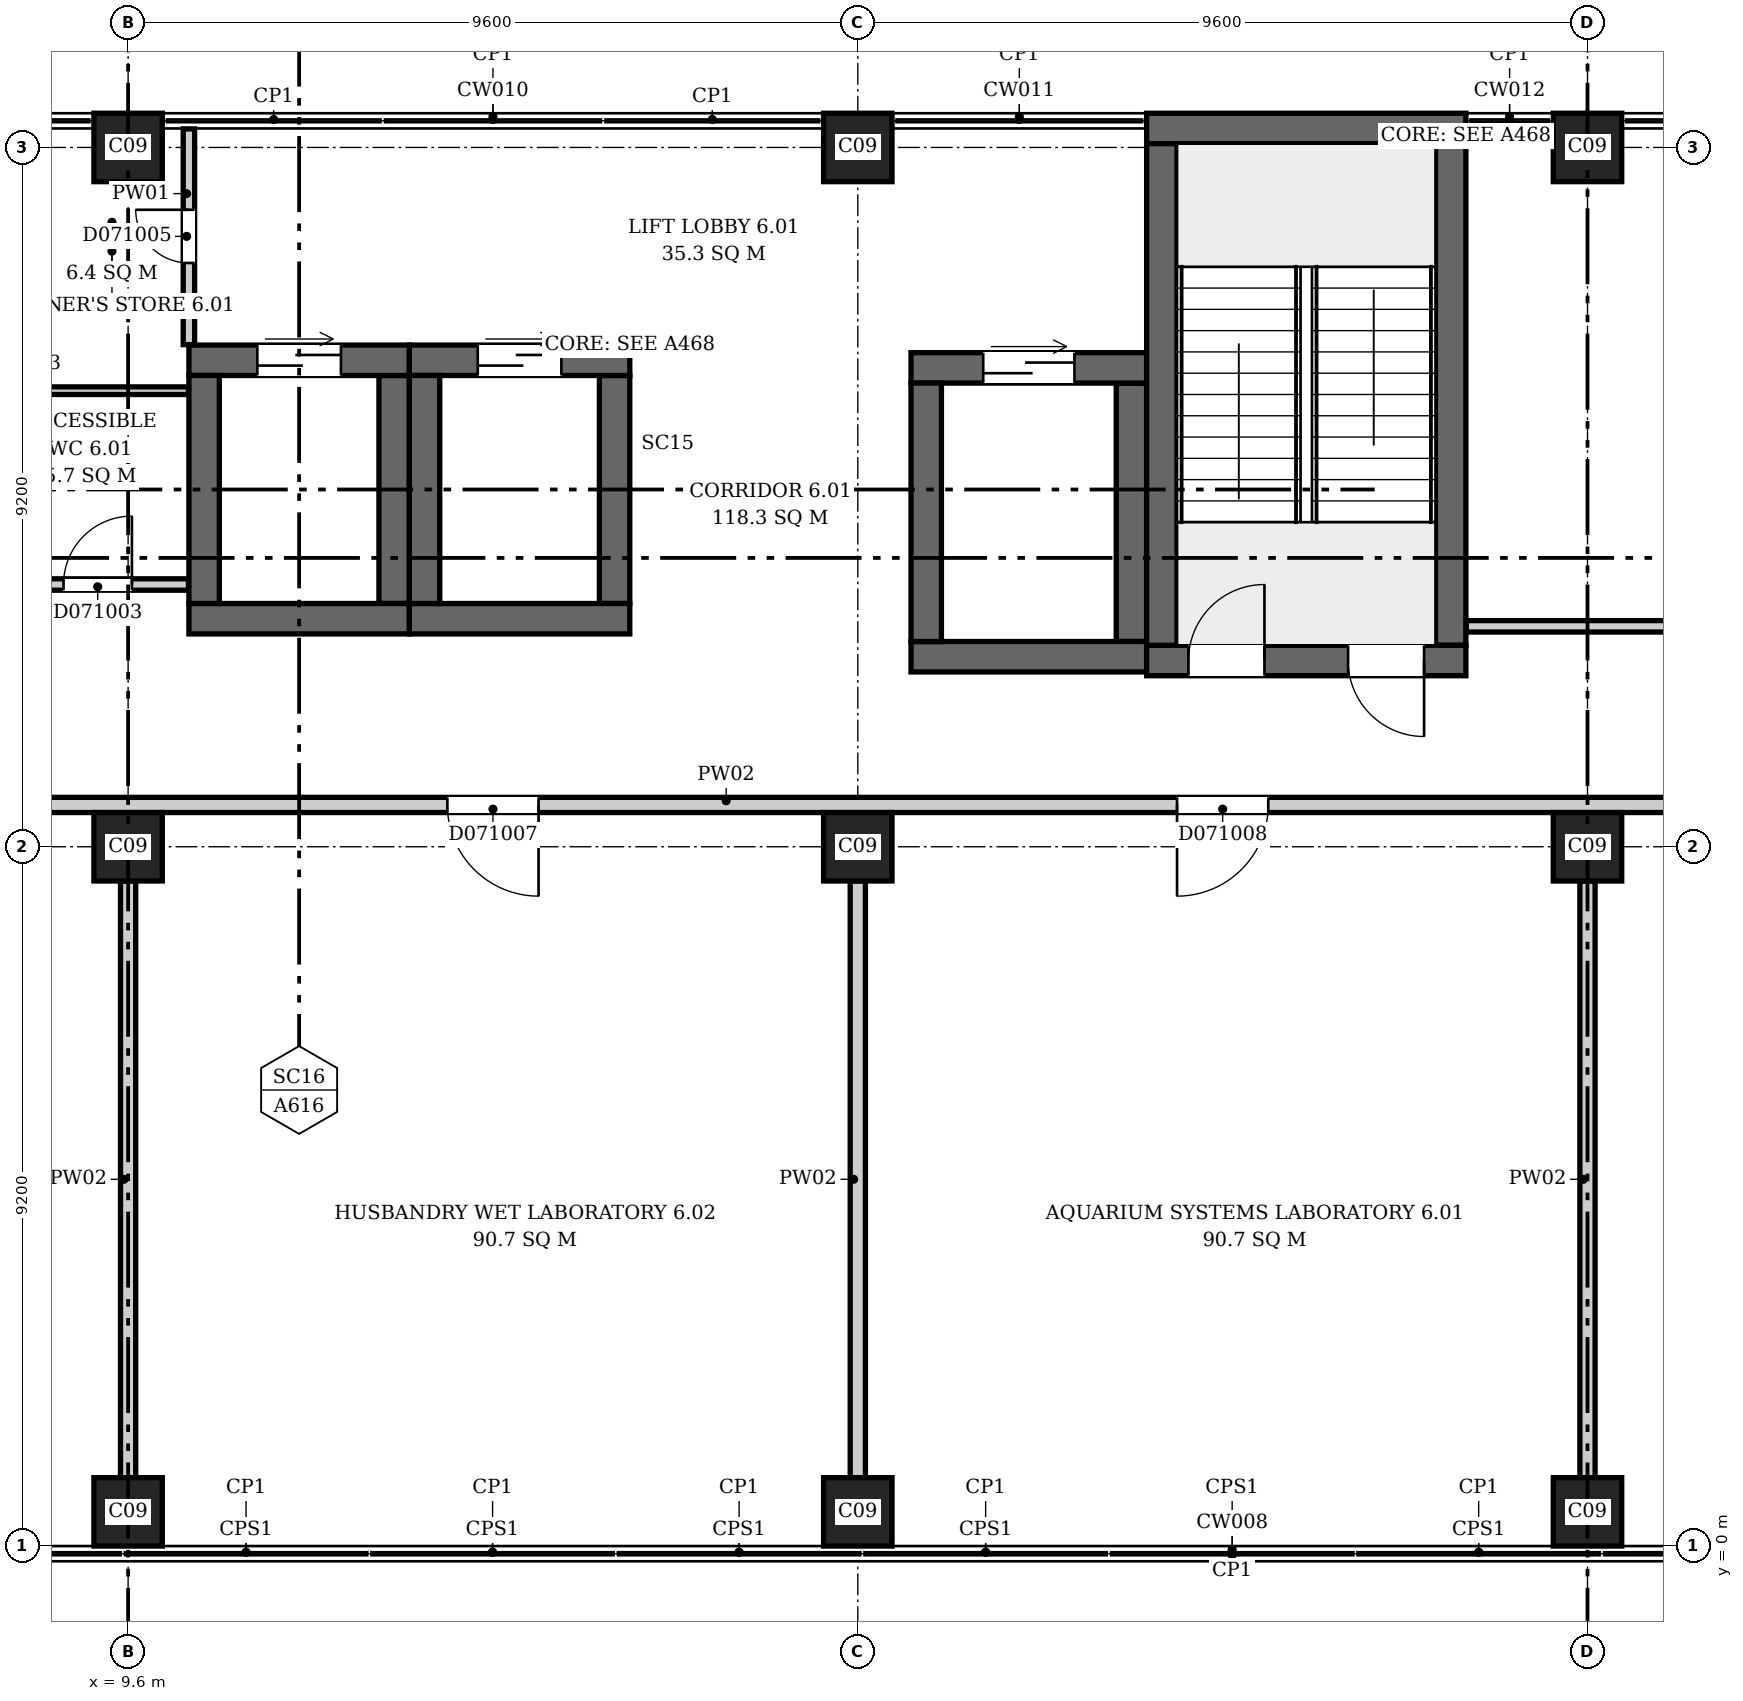
"""IFC4 building model, lengths in metres.
Left out: names, types, materials, properties, quantities, classifications, styles, units other than length and angle.
Written with IfcOpenShell. Run it as: python <this file> out.ifc"""

import sys

from ifc_helpers import new_model, si_unit, direction, frame, frame_2d, origin, origin_2d, place, context, subcontext, project, spatial, rectangle, extrude, element, fill, save


model = new_model("IFC4")
c1 = context("Model", 3, precision=1e-05, world=origin(), true_north=direction((0.0, 1.0)))
c2 = subcontext(c1, "Body", "Model", "MODEL_VIEW")
j1 = project(units=[si_unit("LENGTHUNIT", "METRE"), si_unit("PLANEANGLEUNIT", "RADIAN")], contexts=[c1])
p1 = place(None, origin())
s1 = spatial("IfcSite", under=j1, at=p1, CompositionType="ELEMENT")
p2 = place(p1, origin())
s2 = spatial("IfcBuilding", under=s1, at=p2, CompositionType="ELEMENT")
p3 = place(p2, frame((0.0, 0.0, 36.1)))
s3 = spatial("IfcBuildingStorey", under=s2, at=p3, CompositionType="ELEMENT", Elevation=36.1)
p4 = place(p3, frame((23.0, 11.65, 0.0), z_axis=(0.0, 0.0, 1.0), x_axis=(1.0, 0.0, 0.0)))
e1 = element("IfcWall", 1, at=p4, inside=s3, PredefinedType="SHEAR", context=c2, shape_type="SweptSolid", body=[
    extrude(rectangle(XDim=4.2, YDim=0.4, at=frame_2d((2.1, 0.0))), origin(), (0.0, 0.0, 1.0), 4.2),
])
p5 = place(p4, frame((0.55, 0.0, 0.0)))
e2 = element("IfcOpeningElement", 2, at=p5, cuts=e1, PredefinedType="OPENING", context=c2, shape_type="SweptSolid", body=[
    extrude(rectangle(XDim=1.0, YDim=2.1, at=frame_2d((0.5, 1.05))), frame((0.0, 0.21, 0.0), z_axis=(0.0, -1.0, 0.0), x_axis=(1.0, 0.0, 0.0)), (0.0, 0.0, 1.0), 0.42),
])
p6 = place(p4, frame((2.65, 0.0, 0.0)))
e3 = element("IfcOpeningElement", 3, at=p6, cuts=e1, PredefinedType="OPENING", context=c2, shape_type="SweptSolid", body=[
    extrude(rectangle(XDim=1.0, YDim=2.1, at=frame_2d((0.5, 1.05))), frame((0.0, 0.21, 0.0), z_axis=(0.0, -1.0, 0.0), x_axis=(1.0, 0.0, 0.0)), (0.0, 0.0, 1.0), 0.42),
])
p7 = place(p3, frame((23.0, 18.65, 0.0), z_axis=(0.0, 0.0, 1.0), x_axis=(1.0, 0.0, 0.0)))
e4 = element("IfcWall", 4, at=p7, inside=s3, PredefinedType="SHEAR", context=c2, shape_type="SweptSolid", body=[
    extrude(rectangle(XDim=4.2, YDim=0.4, at=frame_2d((2.1, 0.0))), origin(), (0.0, 0.0, 1.0), 4.2),
])
for number, where, z_axis, x_axis in (
    (5, (23.2, 11.85, 0.0), (0.0, 0.0, 1.0), (0.0, 1.0, 0.0)),
    (6, (27.0, 11.85, 0.0), (0.0, 0.0, 1.0), (0.0, 1.0, 0.0)),
):
    element("IfcWall", number, at=place(p3, frame(where, z_axis=z_axis, x_axis=x_axis)), inside=s3, PredefinedType="SHEAR", context=c2, shape_type="SweptSolid", body=[
        extrude(rectangle(XDim=6.6, YDim=0.4, at=frame_2d((3.3, 0.0))), origin(), (0.0, 0.0, 1.0), 4.2),
    ])
p8 = place(p3, frame((10.4, 12.2, 0.0), z_axis=(0.0, 0.0, 1.0), x_axis=(1.0, 0.0, 0.0)))
e7 = element("IfcWall", 7, at=p8, inside=s3, PredefinedType="SHEAR", context=c2, shape_type="SweptSolid", body=[
    extrude(rectangle(XDim=2.9, YDim=0.4, at=frame_2d((1.45, 0.0))), origin(), (0.0, 0.0, 1.0), 4.2),
])
p9 = place(p3, frame((10.4, 15.6, 0.0), z_axis=(0.0, 0.0, 1.0), x_axis=(1.0, 0.0, 0.0)))
e8 = element("IfcWall", 8, at=p9, inside=s3, PredefinedType="SHEAR", context=c2, shape_type="SweptSolid", body=[
    extrude(rectangle(XDim=2.9, YDim=0.4, at=frame_2d((1.45, 0.0))), origin(), (0.0, 0.0, 1.0), 4.2),
])
p10 = place(p9, frame((0.9, 0.0, 0.0)))
e9 = element("IfcOpeningElement", 9, at=p10, cuts=e8, PredefinedType="OPENING", context=c2, shape_type="SweptSolid", body=[
    extrude(rectangle(XDim=1.1, YDim=2.1, at=frame_2d((0.55, 1.05))), frame((0.0, 0.21, 0.0), z_axis=(0.0, -1.0, 0.0), x_axis=(1.0, 0.0, 0.0)), (0.0, 0.0, 1.0), 0.42),
])
for number, where, z_axis, x_axis in (
    (10, (10.6, 12.4, 0.0), (0.0, 0.0, 1.0), (0.0, 1.0, 0.0)),
    (11, (13.1, 12.4, 0.0), (0.0, 0.0, 1.0), (0.0, 1.0, 0.0)),
):
    element("IfcWall", number, at=place(p3, frame(where, z_axis=z_axis, x_axis=x_axis)), inside=s3, PredefinedType="SHEAR", context=c2, shape_type="SweptSolid", body=[
        extrude(rectangle(XDim=3.0, YDim=0.4, at=frame_2d((1.5, 0.0))), origin(), (0.0, 0.0, 1.0), 4.2),
    ])
p11 = place(p3, frame((13.3, 12.2, 0.0), z_axis=(0.0, 0.0, 1.0), x_axis=(1.0, 0.0, 0.0)))
e12 = element("IfcWall", 12, at=p11, inside=s3, PredefinedType="SHEAR", context=c2, shape_type="SweptSolid", body=[
    extrude(rectangle(XDim=2.9, YDim=0.4, at=frame_2d((1.45, 0.0))), origin(), (0.0, 0.0, 1.0), 4.2),
])
p12 = place(p3, frame((13.3, 15.6, 0.0), z_axis=(0.0, 0.0, 1.0), x_axis=(1.0, 0.0, 0.0)))
e13 = element("IfcWall", 13, at=p12, inside=s3, PredefinedType="SHEAR", context=c2, shape_type="SweptSolid", body=[
    extrude(rectangle(XDim=2.9, YDim=0.4, at=frame_2d((1.45, 0.0))), origin(), (0.0, 0.0, 1.0), 4.2),
])
p13 = place(p12, frame((0.9, 0.0, 0.0)))
e14 = element("IfcOpeningElement", 14, at=p13, cuts=e13, PredefinedType="OPENING", context=c2, shape_type="SweptSolid", body=[
    extrude(rectangle(XDim=1.1, YDim=2.1, at=frame_2d((0.55, 1.05))), frame((0.0, 0.21, 0.0), z_axis=(0.0, -1.0, 0.0), x_axis=(1.0, 0.0, 0.0)), (0.0, 0.0, 1.0), 0.42),
])
for number, where, z_axis, x_axis in (
    (15, (13.5, 12.4, 0.0), (0.0, 0.0, 1.0), (0.0, 1.0, 0.0)),
    (16, (16.0, 12.4, 0.0), (0.0, 0.0, 1.0), (0.0, 1.0, 0.0)),
):
    element("IfcWall", number, at=place(p3, frame(where, z_axis=z_axis, x_axis=x_axis)), inside=s3, PredefinedType="SHEAR", context=c2, shape_type="SweptSolid", body=[
        extrude(rectangle(XDim=3.0, YDim=0.4, at=frame_2d((1.5, 0.0))), origin(), (0.0, 0.0, 1.0), 4.2),
    ])
p14 = place(p3, frame((19.9, 11.7, 0.0), z_axis=(0.0, 0.0, 1.0), x_axis=(1.0, 0.0, 0.0)))
e17 = element("IfcWall", 17, at=p14, inside=s3, PredefinedType="SHEAR", context=c2, shape_type="SweptSolid", body=[
    extrude(rectangle(XDim=3.1, YDim=0.4, at=frame_2d((1.55, 0.0))), origin(), (0.0, 0.0, 1.0), 4.2),
])
p15 = place(p3, frame((19.9, 15.5, 0.0), z_axis=(0.0, 0.0, 1.0), x_axis=(1.0, 0.0, 0.0)))
e18 = element("IfcWall", 18, at=p15, inside=s3, PredefinedType="SHEAR", context=c2, shape_type="SweptSolid", body=[
    extrude(rectangle(XDim=3.1, YDim=0.4, at=frame_2d((1.55, 0.0))), origin(), (0.0, 0.0, 1.0), 4.2),
])
p16 = place(p15, frame((0.95, 0.0, 0.0)))
e19 = element("IfcOpeningElement", 19, at=p16, cuts=e18, PredefinedType="OPENING", context=c2, shape_type="SweptSolid", body=[
    extrude(rectangle(XDim=1.2, YDim=2.1, at=frame_2d((0.6, 1.05))), frame((0.0, 0.21, 0.0), z_axis=(0.0, -1.0, 0.0), x_axis=(1.0, 0.0, 0.0)), (0.0, 0.0, 1.0), 0.42),
])
for number, where, z_axis, x_axis in (
    (20, (20.1, 11.9, 0.0), (0.0, 0.0, 1.0), (0.0, 1.0, 0.0)),
    (21, (22.8, 11.9, 0.0), (0.0, 0.0, 1.0), (0.0, 1.0, 0.0)),
):
    element("IfcWall", number, at=place(p3, frame(where, z_axis=z_axis, x_axis=x_axis)), inside=s3, PredefinedType="SHEAR", context=c2, shape_type="SweptSolid", body=[
        extrude(rectangle(XDim=3.4, YDim=0.4, at=frame_2d((1.7, 0.0))), origin(), (0.0, 0.0, 1.0), 4.2),
    ])
for number, where, z_axis, x_axis in (
    (22, (9.6, 0.45, 0.0), (0.0, 0.0, 1.0), (1.0, 0.0, 0.0)),
    (23, (19.2, 0.45, 0.0), (0.0, 0.0, 1.0), (1.0, 0.0, 0.0)),
    (24, (28.8, 0.45, 0.0), (0.0, 0.0, 1.0), (1.0, 0.0, 0.0)),
    (25, (9.6, 9.2, 0.0), (0.0, 0.0, 1.0), (1.0, 0.0, 0.0)),
    (26, (19.2, 9.2, 0.0), (0.0, 0.0, 1.0), (1.0, 0.0, 0.0)),
    (27, (28.8, 9.2, 0.0), (0.0, 0.0, 1.0), (1.0, 0.0, 0.0)),
    (28, (9.6, 18.4, 0.0), (0.0, 0.0, 1.0), (1.0, 0.0, 0.0)),
    (29, (19.2, 18.4, 0.0), (0.0, 0.0, 1.0), (1.0, 0.0, 0.0)),
    (30, (28.8, 18.4, 0.0), (0.0, 0.0, 1.0), (1.0, 0.0, 0.0)),
):
    element("IfcColumn", number, at=place(p3, frame(where, z_axis=z_axis, x_axis=x_axis)), inside=s3, PredefinedType="COLUMN", context=c2, shape_type="SweptSolid", body=[
        extrude(rectangle(XDim=0.9, YDim=0.9, at=origin_2d()), origin(), (0.0, 0.0, 1.0), 4.2),
    ])
p17 = place(p3, frame((4.3, 9.75, 0.0), z_axis=(0.0, 0.0, 1.0), x_axis=(1.0, 0.0, 0.0)))
e31 = element("IfcWall", 31, at=p17, inside=s3, PredefinedType="PARTITIONING", context=c2, shape_type="SweptSolid", body=[
    extrude(rectangle(XDim=43.894, YDim=0.2, at=frame_2d((21.947, 0.0))), origin(), (0.0, 0.0, 1.0), 3.9),
])
p18 = place(p17, frame((2.1, 0.0, 0.0)))
e32 = element("IfcOpeningElement", 32, at=p18, cuts=e31, PredefinedType="OPENING", context=c2, shape_type="SweptSolid", body=[
    extrude(rectangle(XDim=1.2, YDim=2.1, at=frame_2d((0.6, 1.05))), frame((0.0, 0.11, 0.0), z_axis=(0.0, -1.0, 0.0), x_axis=(1.0, 0.0, 0.0)), (0.0, 0.0, 1.0), 0.22),
])
p19 = place(p17, frame((9.5, 0.0, 0.0)))
e33 = element("IfcOpeningElement", 33, at=p19, cuts=e31, PredefinedType="OPENING", context=c2, shape_type="SweptSolid", body=[
    extrude(rectangle(XDim=1.2, YDim=2.1, at=frame_2d((0.6, 1.05))), frame((0.0, 0.11, 0.0), z_axis=(0.0, -1.0, 0.0), x_axis=(1.0, 0.0, 0.0)), (0.0, 0.0, 1.0), 0.22),
])
p20 = place(p17, frame((19.1, 0.0, 0.0)))
e34 = element("IfcOpeningElement", 34, at=p20, cuts=e31, PredefinedType="OPENING", context=c2, shape_type="SweptSolid", body=[
    extrude(rectangle(XDim=1.2, YDim=2.1, at=frame_2d((0.6, 1.05))), frame((0.0, 0.11, 0.0), z_axis=(0.0, -1.0, 0.0), x_axis=(1.0, 0.0, 0.0)), (0.0, 0.0, 1.0), 0.22),
])
p21 = place(p17, frame((28.7, 0.0, 0.0)))
e35 = element("IfcOpeningElement", 35, at=p21, cuts=e31, PredefinedType="OPENING", context=c2, shape_type="SweptSolid", body=[
    extrude(rectangle(XDim=1.2, YDim=2.1, at=frame_2d((0.6, 1.05))), frame((0.0, 0.11, 0.0), z_axis=(0.0, -1.0, 0.0), x_axis=(1.0, 0.0, 0.0)), (0.0, 0.0, 1.0), 0.22),
])
p22 = place(p17, frame((38.4, 0.0, 0.0)))
e36 = element("IfcOpeningElement", 36, at=p22, cuts=e31, PredefinedType="OPENING", context=c2, shape_type="SweptSolid", body=[
    extrude(rectangle(XDim=1.2, YDim=2.1, at=frame_2d((0.6, 1.05))), frame((0.0, 0.11, 0.0), z_axis=(0.0, -1.0, 0.0), x_axis=(1.0, 0.0, 0.0)), (0.0, 0.0, 1.0), 0.22),
])
p23 = place(p3, frame((6.125, 12.65, 0.0), z_axis=(0.0, 0.0, 1.0), x_axis=(1.0, 0.0, 0.0)))
e37 = element("IfcWall", 37, at=p23, inside=s3, PredefinedType="PARTITIONING", context=c2, shape_type="SweptSolid", body=[
    extrude(rectangle(XDim=4.269, YDim=0.15, at=frame_2d((2.135, 0.0))), origin(), (0.0, 0.0, 1.0), 3.9),
])
p24 = place(p23, frame((2.625, 0.0, 0.0)))
e38 = element("IfcOpeningElement", 38, at=p24, cuts=e37, PredefinedType="OPENING", context=c2, shape_type="SweptSolid", body=[
    extrude(rectangle(XDim=0.9, YDim=2.1, at=frame_2d((0.45, 1.05))), frame((0.0, 0.085, 0.0), z_axis=(0.0, -1.0, 0.0), x_axis=(1.0, 0.0, 0.0)), (0.0, 0.0, 1.0), 0.17),
])
p25 = place(p3, frame((6.275, 15.2, 0.0), z_axis=(0.0, 0.0, 1.0), x_axis=(1.0, 0.0, 0.0)))
e39 = element("IfcWall", 39, at=p25, inside=s3, PredefinedType="PARTITIONING", context=c2, shape_type="SweptSolid", body=[
    extrude(rectangle(XDim=4.119, YDim=0.1, at=frame_2d((2.06, 0.0))), origin(), (0.0, 0.0, 1.0), 3.9),
])
p26 = place(p3, frame((9.6, 0.9, 0.0), z_axis=(0.0, 0.0, 1.0), x_axis=(0.0, 1.0, 0.0)))
e40 = element("IfcWall", 40, at=p26, inside=s3, PredefinedType="PARTITIONING", context=c2, shape_type="SweptSolid", body=[
    extrude(rectangle(XDim=7.85, YDim=0.2, at=frame_2d((3.925, 0.0))), origin(), (0.0, 0.0, 1.0), 3.9),
])
p27 = place(p3, frame((10.4, 15.806, 0.0), z_axis=(0.0, 0.0, 1.0), x_axis=(0.0, 1.0, 0.0)))
e41 = element("IfcWall", 41, at=p27, inside=s3, PredefinedType="PARTITIONING", context=c2, shape_type="SweptSolid", body=[
    extrude(rectangle(XDim=2.838, YDim=0.15, at=frame_2d((1.419, 0.0))), origin(), (0.0, 0.0, 1.0), 3.9),
])
p28 = place(p27, frame((1.074, 0.0, 0.0)))
e42 = element("IfcOpeningElement", 42, at=p28, cuts=e41, PredefinedType="OPENING", context=c2, shape_type="SweptSolid", body=[
    extrude(rectangle(XDim=0.7, YDim=2.1, at=frame_2d((0.35, 1.05))), frame((0.0, 0.085, 0.0), z_axis=(0.0, -1.0, 0.0), x_axis=(1.0, 0.0, 0.0)), (0.0, 0.0, 1.0), 0.17),
])
p29 = place(p3, frame((19.2, 0.9, 0.0), z_axis=(0.0, 0.0, 1.0), x_axis=(0.0, 1.0, 0.0)))
e43 = element("IfcWall", 43, at=p29, inside=s3, PredefinedType="PARTITIONING", context=c2, shape_type="SweptSolid", body=[
    extrude(rectangle(XDim=7.85, YDim=0.2, at=frame_2d((3.925, 0.0))), origin(), (0.0, 0.0, 1.0), 3.9),
])
p30 = place(p3, frame((27.206, 12.1, 0.0), z_axis=(0.0, 0.0, 1.0), x_axis=(1.0, 0.0, 0.0)))
e44 = element("IfcWall", 44, at=p30, inside=s3, PredefinedType="PARTITIONING", context=c2, shape_type="SweptSolid", body=[
    extrude(rectangle(XDim=20.988, YDim=0.15, at=frame_2d((10.494, 0.0))), origin(), (0.0, 0.0, 1.0), 3.9),
])
p31 = place(p30, frame((2.744, 0.0, 0.0)))
e45 = element("IfcOpeningElement", 45, at=p31, cuts=e44, PredefinedType="OPENING", context=c2, shape_type="SweptSolid", body=[
    extrude(rectangle(XDim=0.9, YDim=2.1, at=frame_2d((0.45, 1.05))), frame((0.0, 0.085, 0.0), z_axis=(0.0, -1.0, 0.0), x_axis=(1.0, 0.0, 0.0)), (0.0, 0.0, 1.0), 0.17),
])
p32 = place(p30, frame((13.194, 0.0, 0.0)))
e46 = element("IfcOpeningElement", 46, at=p32, cuts=e44, PredefinedType="OPENING", context=c2, shape_type="SweptSolid", body=[
    extrude(rectangle(XDim=1.0, YDim=2.1, at=frame_2d((0.5, 1.05))), frame((0.0, 0.085, 0.0), z_axis=(0.0, -1.0, 0.0), x_axis=(1.0, 0.0, 0.0)), (0.0, 0.0, 1.0), 0.17),
])
p33 = place(p3, frame((28.8, 0.9, 0.0), z_axis=(0.0, 0.0, 1.0), x_axis=(0.0, 1.0, 0.0)))
e47 = element("IfcWall", 47, at=p33, inside=s3, PredefinedType="PARTITIONING", context=c2, shape_type="SweptSolid", body=[
    extrude(rectangle(XDim=7.85, YDim=0.2, at=frame_2d((3.925, 0.0))), origin(), (0.0, 0.0, 1.0), 3.9),
])
p34 = place(p5, origin())
e48 = element("IfcDoor", 48, at=p34, inside=s3, OperationType="SINGLE_SWING_RIGHT", PredefinedType="DOOR", context=c2, shape_type="SweptSolid", body=[
    extrude(rectangle(XDim=1.0, YDim=2.1, at=frame_2d((0.5, 1.05))), frame((0.0, 0.025, 0.0), z_axis=(0.0, -1.0, 0.0), x_axis=(1.0, 0.0, 0.0)), (0.0, 0.0, 1.0), 0.05),
])
fill(e2, e48)
p35 = place(p6, origin())
e49 = element("IfcDoor", 49, at=p35, inside=s3, OperationType="SINGLE_SWING_LEFT", PredefinedType="DOOR", context=c2, shape_type="SweptSolid", body=[
    extrude(rectangle(XDim=1.0, YDim=2.1, at=frame_2d((0.5, 1.05))), frame((0.0, 0.025, 0.0), z_axis=(0.0, -1.0, 0.0), x_axis=(1.0, 0.0, 0.0)), (0.0, 0.0, 1.0), 0.05),
])
fill(e3, e49)
p36 = place(p10, origin())
e50 = element("IfcDoor", 50, at=p36, inside=s3, OperationType="DOUBLE_DOOR_SLIDING", PredefinedType="DOOR", context=c2, shape_type="SweptSolid", body=[
    extrude(rectangle(XDim=1.1, YDim=2.1, at=frame_2d((0.55, 1.05))), frame((0.0, 0.025, 0.0), z_axis=(0.0, -1.0, 0.0), x_axis=(1.0, 0.0, 0.0)), (0.0, 0.0, 1.0), 0.05),
])
fill(e9, e50)
p37 = place(p13, origin())
e51 = element("IfcDoor", 51, at=p37, inside=s3, OperationType="DOUBLE_DOOR_SLIDING", PredefinedType="DOOR", context=c2, shape_type="SweptSolid", body=[
    extrude(rectangle(XDim=1.1, YDim=2.1, at=frame_2d((0.55, 1.05))), frame((0.0, 0.025, 0.0), z_axis=(0.0, -1.0, 0.0), x_axis=(1.0, 0.0, 0.0)), (0.0, 0.0, 1.0), 0.05),
])
fill(e14, e51)
p38 = place(p16, origin())
e52 = element("IfcDoor", 52, at=p38, inside=s3, OperationType="DOUBLE_DOOR_SLIDING", PredefinedType="DOOR", context=c2, shape_type="SweptSolid", body=[
    extrude(rectangle(XDim=1.2, YDim=2.1, at=frame_2d((0.6, 1.05))), frame((0.0, 0.025, 0.0), z_axis=(0.0, -1.0, 0.0), x_axis=(1.0, 0.0, 0.0)), (0.0, 0.0, 1.0), 0.05),
])
fill(e19, e52)
p39 = place(p24, origin())
e53 = element("IfcDoor", 53, at=p39, inside=s3, OperationType="SINGLE_SWING_RIGHT", PredefinedType="DOOR", context=c2, shape_type="SweptSolid", body=[
    extrude(rectangle(XDim=0.9, YDim=2.1, at=frame_2d((0.45, 1.05))), frame((0.0, 0.025, 0.0), z_axis=(0.0, -1.0, 0.0), x_axis=(1.0, 0.0, 0.0)), (0.0, 0.0, 1.0), 0.05),
])
fill(e38, e53)
p40 = place(p28, origin())
e54 = element("IfcDoor", 54, at=p40, inside=s3, OperationType="SINGLE_SWING_LEFT", PredefinedType="DOOR", context=c2, shape_type="SweptSolid", body=[
    extrude(rectangle(XDim=0.7, YDim=2.1, at=frame_2d((0.35, 1.05))), frame((0.0, 0.025, 0.0), z_axis=(0.0, -1.0, 0.0), x_axis=(1.0, 0.0, 0.0)), (0.0, 0.0, 1.0), 0.05),
])
fill(e42, e54)
p41 = place(p19, origin())
e55 = element("IfcDoor", 55, at=p41, inside=s3, OperationType="SINGLE_SWING_RIGHT", PredefinedType="DOOR", context=c2, shape_type="SweptSolid", body=[
    extrude(rectangle(XDim=1.2, YDim=2.1, at=frame_2d((0.6, 1.05))), frame((0.0, 0.025, 0.0), z_axis=(0.0, -1.0, 0.0), x_axis=(1.0, 0.0, 0.0)), (0.0, 0.0, 1.0), 0.05),
])
fill(e33, e55)
p42 = place(p20, origin())
e56 = element("IfcDoor", 56, at=p42, inside=s3, OperationType="SINGLE_SWING_LEFT", PredefinedType="DOOR", context=c2, shape_type="SweptSolid", body=[
    extrude(rectangle(XDim=1.2, YDim=2.1, at=frame_2d((0.6, 1.05))), frame((0.0, 0.025, 0.0), z_axis=(0.0, -1.0, 0.0), x_axis=(1.0, 0.0, 0.0)), (0.0, 0.0, 1.0), 0.05),
])
fill(e34, e56)
save(model, sys.argv[1])
